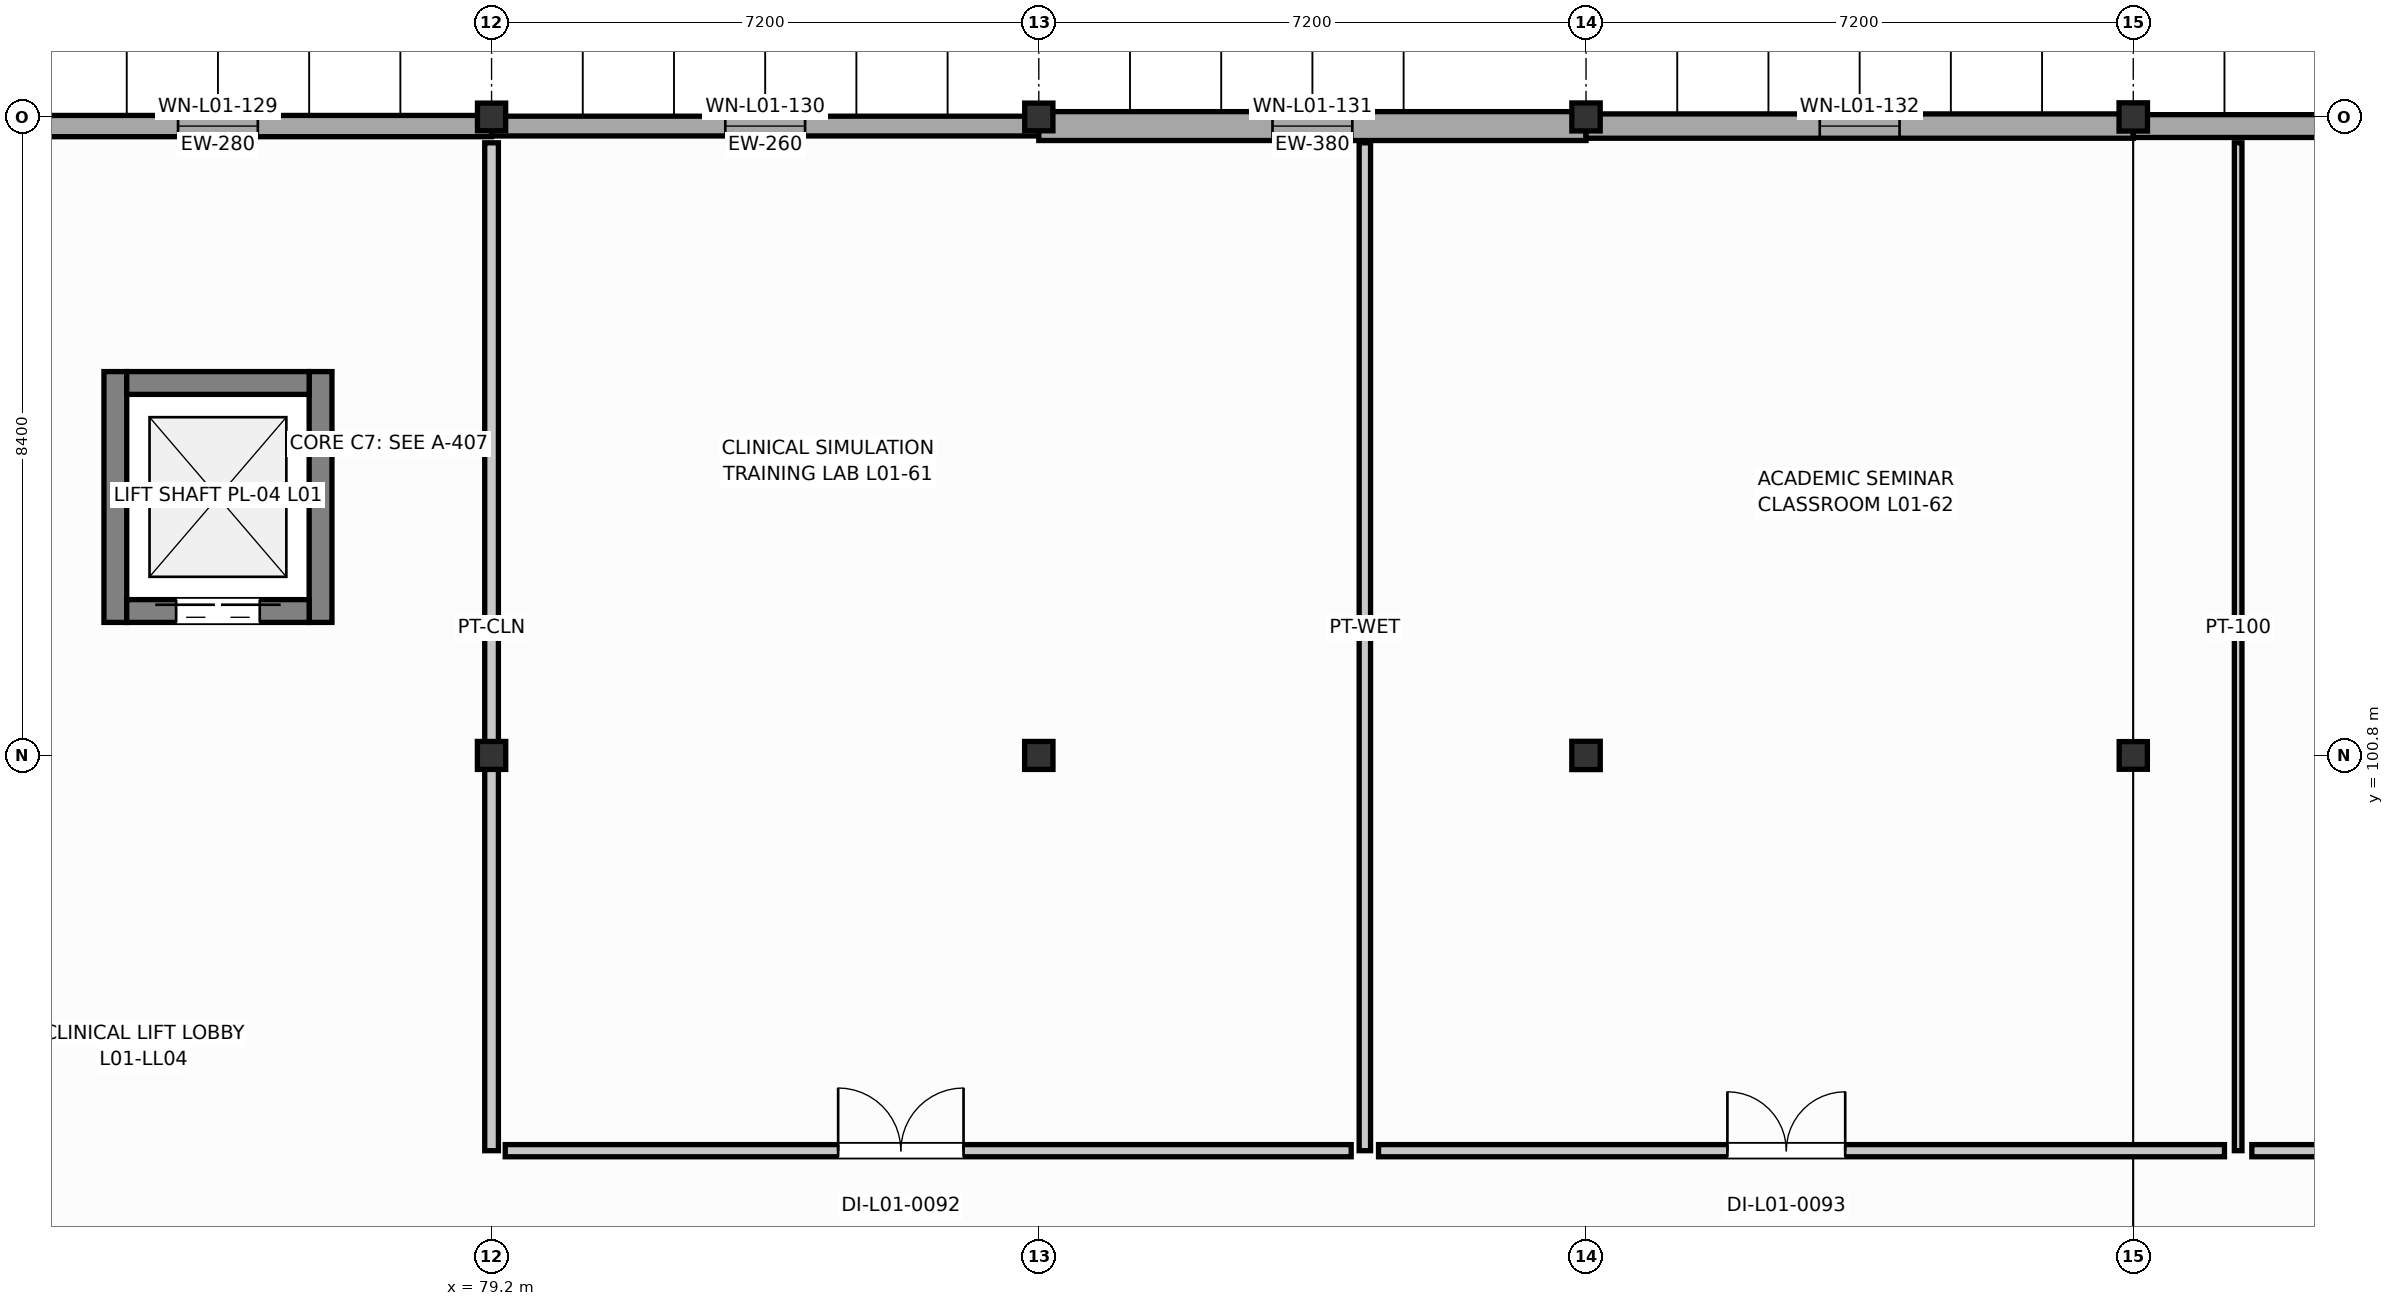
"""IFC4 building model, lengths in metres.
Left out: names, types, materials, properties, quantities, classifications, styles, units other than length and angle.
Written with IfcOpenShell. Run it as: python <this file> out.ifc"""

import sys

from ifc_helpers import new_model, si_unit, direction, frame, frame_2d, origin, origin_2d, place, context, subcontext, project, spatial, rectangle, i_section, extrude, element, fill, save


model = new_model("IFC4")
c1 = context("Model", 3, precision=1e-05, world=origin(), true_north=direction((0.0, 1.0)))
c2 = subcontext(c1, "Body", "Model", "MODEL_VIEW")
j1 = project(units=[si_unit("LENGTHUNIT", "METRE"), si_unit("PLANEANGLEUNIT", "RADIAN")], contexts=[c1])
p1 = place(None, origin())
s1 = spatial("IfcSite", under=j1, at=p1, CompositionType="ELEMENT")
p2 = place(p1, origin())
s2 = spatial("IfcBuilding", under=s1, at=p2, CompositionType="ELEMENT")
p3 = place(p2, frame((0.0, 0.0, 4.8)))
s3 = spatial("IfcBuildingStorey", under=s2, at=p3, CompositionType="ELEMENT", Elevation=4.8)
p4 = place(p3, frame((79.2, 100.8, 0.0), z_axis=(0.0, 0.0, 1.0), x_axis=(1.0, 0.0, 0.0)))
e1 = element("IfcColumn", 1, at=p4, inside=s3, PredefinedType="COLUMN", context=c2, shape_type="SweptSolid", body=[
    extrude(i_section(OverallWidth=0.373, OverallDepth=0.368, WebThickness=0.015, FlangeThickness=0.024, FilletRadius=0.02, at=origin_2d()), origin(), (0.0, 0.0, 1.0), 4.2),
])
p5 = place(p3, frame((79.2, 109.2, 0.0), z_axis=(0.0, 0.0, 1.0), x_axis=(1.0, 0.0, 0.0)))
e2 = element("IfcColumn", 2, at=p5, inside=s3, PredefinedType="COLUMN", context=c2, shape_type="SweptSolid", body=[
    extrude(i_section(OverallWidth=0.371, OverallDepth=0.364, WebThickness=0.013, FlangeThickness=0.022, FilletRadius=0.02, at=origin_2d()), origin(), (0.0, 0.0, 1.0), 4.2),
])
p6 = place(p3, frame((86.4, 100.8, 0.0), z_axis=(0.0, 0.0, 1.0), x_axis=(1.0, 0.0, 0.0)))
e3 = element("IfcColumn", 3, at=p6, inside=s3, PredefinedType="COLUMN", context=c2, shape_type="SweptSolid", body=[
    extrude(i_section(OverallWidth=0.373, OverallDepth=0.368, WebThickness=0.015, FlangeThickness=0.024, FilletRadius=0.02, at=origin_2d()), origin(), (0.0, 0.0, 1.0), 4.2),
])
p7 = place(p3, frame((86.4, 109.2, 0.0), z_axis=(0.0, 0.0, 1.0), x_axis=(1.0, 0.0, 0.0)))
e4 = element("IfcColumn", 4, at=p7, inside=s3, PredefinedType="COLUMN", context=c2, shape_type="SweptSolid", body=[
    extrude(i_section(OverallWidth=0.371, OverallDepth=0.364, WebThickness=0.013, FlangeThickness=0.022, FilletRadius=0.02, at=origin_2d()), origin(), (0.0, 0.0, 1.0), 4.2),
])
p8 = place(p3, frame((93.6, 100.8, 0.0), z_axis=(0.0, 0.0, 1.0), x_axis=(1.0, 0.0, 0.0)))
e5 = element("IfcColumn", 5, at=p8, inside=s3, PredefinedType="COLUMN", context=c2, shape_type="SweptSolid", body=[
    extrude(i_section(OverallWidth=0.374, OverallDepth=0.372, WebThickness=0.016, FlangeThickness=0.026, FilletRadius=0.02, at=origin_2d()), origin(), (0.0, 0.0, 1.0), 4.2),
])
p9 = place(p3, frame((93.6, 109.2, 0.0), z_axis=(0.0, 0.0, 1.0), x_axis=(1.0, 0.0, 0.0)))
e6 = element("IfcColumn", 6, at=p9, inside=s3, PredefinedType="COLUMN", context=c2, shape_type="SweptSolid", body=[
    extrude(i_section(OverallWidth=0.373, OverallDepth=0.368, WebThickness=0.015, FlangeThickness=0.024, FilletRadius=0.02, at=origin_2d()), origin(), (0.0, 0.0, 1.0), 4.2),
])
p10 = place(p3, frame((100.8, 100.8, 0.0), z_axis=(0.0, 0.0, 1.0), x_axis=(1.0, 0.0, 0.0)))
e7 = element("IfcColumn", 7, at=p10, inside=s3, PredefinedType="COLUMN", context=c2, shape_type="SweptSolid", body=[
    extrude(i_section(OverallWidth=0.371, OverallDepth=0.364, WebThickness=0.013, FlangeThickness=0.022, FilletRadius=0.02, at=origin_2d()), origin(), (0.0, 0.0, 1.0), 4.2),
])
p11 = place(p3, frame((100.8, 109.2, 0.0), z_axis=(0.0, 0.0, 1.0), x_axis=(1.0, 0.0, 0.0)))
e8 = element("IfcColumn", 8, at=p11, inside=s3, PredefinedType="COLUMN", context=c2, shape_type="SweptSolid", body=[
    extrude(i_section(OverallWidth=0.374, OverallDepth=0.372, WebThickness=0.016, FlangeThickness=0.026, FilletRadius=0.02, at=origin_2d()), origin(), (0.0, 0.0, 1.0), 4.2),
])
for number, where, z_axis, x_axis in (
    (9, (74.25, 102.55, 0.0), (0.0, 0.0, 1.0), (0.0, 1.0, 0.0)),
    (10, (76.95, 102.55, 0.0), (0.0, 0.0, 1.0), (0.0, 1.0, 0.0)),
):
    element("IfcWall", number, at=place(p3, frame(where, z_axis=z_axis, x_axis=x_axis)), inside=s3, PredefinedType="SHEAR", context=c2, shape_type="SweptSolid", body=[
        extrude(rectangle(XDim=3.3, YDim=0.3, at=frame_2d((1.65, 0.0))), origin(), (0.0, 0.0, 1.0), 3.97),
    ])
p12 = place(p3, frame((74.4, 105.7, 0.0), z_axis=(0.0, 0.0, 1.0), x_axis=(1.0, 0.0, 0.0)))
e11 = element("IfcWall", 11, at=p12, inside=s3, PredefinedType="SHEAR", context=c2, shape_type="SweptSolid", body=[
    extrude(rectangle(XDim=2.4, YDim=0.3, at=frame_2d((1.2, 0.0))), origin(), (0.0, 0.0, 1.0), 3.97),
])
p13 = place(p3, frame((74.4, 102.7, 0.0), z_axis=(0.0, 0.0, 1.0), x_axis=(1.0, 0.0, 0.0)))
e12 = element("IfcWall", 12, at=p13, inside=s3, PredefinedType="SHEAR", context=c2, shape_type="SweptSolid", body=[
    extrude(rectangle(XDim=2.4, YDim=0.3, at=frame_2d((1.2, 0.0))), origin(), (0.0, 0.0, 1.0), 3.97),
])
p14 = place(p13, frame((0.65, 0.0, 0.0)))
e13 = element("IfcOpeningElement", 13, at=p14, cuts=e12, PredefinedType="OPENING", context=c2, shape_type="SweptSolid", body=[
    extrude(rectangle(XDim=1.1, YDim=2.15, at=frame_2d((0.55, 1.075))), frame((0.0, 0.16, 0.0), z_axis=(0.0, -1.0, 0.0), x_axis=(1.0, 0.0, 0.0)), (0.0, 0.0, 1.0), 0.32),
])
p15 = place(p3, frame((72.0, 109.08, 0.0), z_axis=(0.0, 0.0, 1.0), x_axis=(1.0, 0.0, 0.0)))
e14 = element("IfcWall", 14, at=p15, inside=s3, PredefinedType="SOLIDWALL", context=c2, shape_type="SweptSolid", body=[
    extrude(rectangle(XDim=7.2, YDim=0.28, at=frame_2d((3.6, 0.0))), origin(), (0.0, 0.0, 1.0), 3.482),
])
p16 = place(p15, frame((3.075, 0.0, 0.95)))
e15 = element("IfcOpeningElement", 15, at=p16, cuts=e14, PredefinedType="OPENING", context=c2, shape_type="SweptSolid", body=[
    extrude(rectangle(XDim=1.05, YDim=1.15, at=frame_2d((0.525, 0.575))), frame((0.0, 0.15, 0.0), z_axis=(0.0, -1.0, 0.0), x_axis=(1.0, 0.0, 0.0)), (0.0, 0.0, 1.0), 0.3),
])
p17 = place(p3, frame((79.2, 109.08, 0.0), z_axis=(0.0, 0.0, 1.0), x_axis=(1.0, 0.0, 0.0)))
e16 = element("IfcWall", 16, at=p17, inside=s3, PredefinedType="SOLIDWALL", context=c2, shape_type="SweptSolid", body=[
    extrude(rectangle(XDim=7.2, YDim=0.26, at=frame_2d((3.6, 0.0))), origin(), (0.0, 0.0, 1.0), 3.482),
])
p18 = place(p17, frame((3.075, 0.0, 0.95)))
e17 = element("IfcOpeningElement", 17, at=p18, cuts=e16, PredefinedType="OPENING", context=c2, shape_type="SweptSolid", body=[
    extrude(rectangle(XDim=1.05, YDim=1.35, at=frame_2d((0.525, 0.675))), frame((0.0, 0.14, 0.0), z_axis=(0.0, -1.0, 0.0), x_axis=(1.0, 0.0, 0.0)), (0.0, 0.0, 1.0), 0.28),
])
p19 = place(p3, frame((86.4, 109.08, 0.0), z_axis=(0.0, 0.0, 1.0), x_axis=(1.0, 0.0, 0.0)))
e18 = element("IfcWall", 18, at=p19, inside=s3, PredefinedType="SOLIDWALL", context=c2, shape_type="SweptSolid", body=[
    extrude(rectangle(XDim=7.2, YDim=0.38, at=frame_2d((3.6, 0.0))), origin(), (0.0, 0.0, 1.0), 3.482),
])
p20 = place(p19, frame((3.075, 0.0, 0.95)))
e19 = element("IfcOpeningElement", 19, at=p20, cuts=e18, PredefinedType="OPENING", context=c2, shape_type="SweptSolid", body=[
    extrude(rectangle(XDim=1.05, YDim=1.55, at=frame_2d((0.525, 0.775))), frame((0.0, 0.2, 0.0), z_axis=(0.0, -1.0, 0.0), x_axis=(1.0, 0.0, 0.0)), (0.0, 0.0, 1.0), 0.4),
])
p21 = place(p3, frame((93.6, 109.08, 0.0), z_axis=(0.0, 0.0, 1.0), x_axis=(1.0, 0.0, 0.0)))
e20 = element("IfcWall", 20, at=p21, inside=s3, PredefinedType="SOLIDWALL", context=c2, shape_type="SweptSolid", body=[
    extrude(rectangle(XDim=7.2, YDim=0.32, at=frame_2d((3.6, 0.0))), origin(), (0.0, 0.0, 1.0), 3.482),
])
p22 = place(p21, frame((3.075, 0.0, 0.95)))
e21 = element("IfcOpeningElement", 21, at=p22, cuts=e20, PredefinedType="OPENING", context=c2, shape_type="SweptSolid", body=[
    extrude(rectangle(XDim=1.05, YDim=1.75, at=frame_2d((0.525, 0.875))), frame((0.0, 0.17, 0.0), z_axis=(0.0, -1.0, 0.0), x_axis=(1.0, 0.0, 0.0)), (0.0, 0.0, 1.0), 0.34),
])
p23 = place(p3, frame((100.8, 109.08, 0.0), z_axis=(0.0, 0.0, 1.0), x_axis=(1.0, 0.0, 0.0)))
e22 = element("IfcWall", 22, at=p23, inside=s3, PredefinedType="SOLIDWALL", context=c2, shape_type="SweptSolid", body=[
    extrude(rectangle(XDim=7.2, YDim=0.3, at=frame_2d((3.6, 0.0))), origin(), (0.0, 0.0, 1.0), 3.482),
])
p24 = place(p23, frame((3.0, 0.0, 0.95)))
e23 = element("IfcOpeningElement", 23, at=p24, cuts=e22, PredefinedType="OPENING", context=c2, shape_type="SweptSolid", body=[
    extrude(rectangle(XDim=1.2, YDim=1.15, at=frame_2d((0.6, 0.575))), frame((0.0, 0.16, 0.0), z_axis=(0.0, -1.0, 0.0), x_axis=(1.0, 0.0, 0.0)), (0.0, 0.0, 1.0), 0.32),
])
p25 = place(p3, frame((79.2, 95.6, 0.0), z_axis=(0.0, 0.0, 1.0), x_axis=(0.0, 1.0, 0.0)))
e24 = element("IfcWall", 24, at=p25, inside=s3, PredefinedType="PARTITIONING", context=c2, shape_type="SweptSolid", body=[
    extrude(rectangle(XDim=13.26, YDim=0.18, at=frame_2d((6.63, 0.0))), origin(), (0.0, 0.0, 1.0), 3.328),
])
p26 = place(p3, frame((90.69, 108.86, 0.0), z_axis=(0.0, 0.0, 1.0), x_axis=(0.0, -1.0, 0.0)))
e25 = element("IfcWall", 25, at=p26, inside=s3, PredefinedType="PLUMBINGWALL", context=c2, shape_type="SweptSolid", body=[
    extrude(rectangle(XDim=13.26, YDim=0.15, at=frame_2d((6.63, 0.0))), origin(), (0.0, 0.0, 1.0), 3.535),
])
p27 = place(p3, frame((90.51, 95.6, 0.0), z_axis=(0.0, 0.0, 1.0), x_axis=(-1.0, 0.0, 0.0)))
e26 = element("IfcWall", 26, at=p27, inside=s3, PredefinedType="PARTITIONING", context=c2, shape_type="SweptSolid", body=[
    extrude(rectangle(XDim=11.13, YDim=0.16, at=frame_2d((5.565, 0.0))), origin(), (0.0, 0.0, 1.0), 3.328),
])
p28 = place(p27, frame((5.1, 0.0, 0.0)))
e27 = element("IfcOpeningElement", 27, at=p28, cuts=e26, PredefinedType="OPENING", context=c2, shape_type="SweptSolid", body=[
    extrude(rectangle(XDim=1.65, YDim=2.2, at=frame_2d((0.825, 1.1))), frame((0.0, 0.09, 0.0), z_axis=(0.0, -1.0, 0.0), x_axis=(1.0, 0.0, 0.0)), (0.0, 0.0, 1.0), 0.18),
])
p29 = place(p3, frame((102.18, 108.86, 0.0), z_axis=(0.0, 0.0, 1.0), x_axis=(0.0, -1.0, 0.0)))
e28 = element("IfcWall", 28, at=p29, inside=s3, PredefinedType="PARTITIONING", context=c2, shape_type="SweptSolid", body=[
    extrude(rectangle(XDim=13.26, YDim=0.1, at=frame_2d((6.63, 0.0))), origin(), (0.0, 0.0, 1.0), 3.257),
])
p30 = place(p3, frame((102.0, 95.6, 0.0), z_axis=(0.0, 0.0, 1.0), x_axis=(-1.0, 0.0, 0.0)))
e29 = element("IfcWall", 29, at=p30, inside=s3, PredefinedType="PARTITIONING", context=c2, shape_type="SweptSolid", body=[
    extrude(rectangle(XDim=11.13, YDim=0.16, at=frame_2d((5.565, 0.0))), origin(), (0.0, 0.0, 1.0), 3.175),
])
p31 = place(p30, frame((4.99, 0.0, 0.0)))
e30 = element("IfcOpeningElement", 30, at=p31, cuts=e29, PredefinedType="OPENING", context=c2, shape_type="SweptSolid", body=[
    extrude(rectangle(XDim=1.55, YDim=2.2, at=frame_2d((0.775, 1.1))), frame((0.0, 0.09, 0.0), z_axis=(0.0, -1.0, 0.0), x_axis=(1.0, 0.0, 0.0)), (0.0, 0.0, 1.0), 0.18),
])
p32 = place(p3, frame((113.49, 95.6, 0.0), z_axis=(0.0, 0.0, 1.0), x_axis=(-1.0, 0.0, 0.0)))
e31 = element("IfcWall", 31, at=p32, inside=s3, PredefinedType="PARTITIONING", context=c2, shape_type="SweptSolid", body=[
    extrude(rectangle(XDim=11.13, YDim=0.16, at=frame_2d((5.565, 0.0))), origin(), (0.0, 0.0, 1.0), 3.328),
])
p33 = place(p32, frame((5.225, 0.0, 0.0)))
e32 = element("IfcOpeningElement", 32, at=p33, cuts=e31, PredefinedType="OPENING", context=c2, shape_type="SweptSolid", body=[
    extrude(rectangle(XDim=1.08, YDim=2.15, at=frame_2d((0.54, 1.075))), frame((0.0, 0.09, 0.0), z_axis=(0.0, -1.0, 0.0), x_axis=(1.0, 0.0, 0.0)), (0.0, 0.0, 1.0), 0.18),
])
p34 = place(p14, origin())
e33 = element("IfcDoor", 33, at=p34, inside=s3, OperationType="DOUBLE_DOOR_SLIDING", PredefinedType="DOOR", context=c2, shape_type="SweptSolid", body=[
    extrude(rectangle(XDim=1.1, YDim=2.15, at=frame_2d((0.55, 1.075))), frame((0.0, 0.025, 0.0), z_axis=(0.0, -1.0, 0.0), x_axis=(1.0, 0.0, 0.0)), (0.0, 0.0, 1.0), 0.05),
])
fill(e13, e33)
p35 = place(p16, origin())
e34 = element("IfcWindow", 34, at=p35, inside=s3, PartitioningType="SINGLE_PANEL", PredefinedType="WINDOW", context=c2, shape_type="SweptSolid", body=[
    extrude(rectangle(XDim=1.05, YDim=1.15, at=frame_2d((0.525, 0.575))), frame((0.0, 0.03, 0.0), z_axis=(0.0, -1.0, 0.0), x_axis=(1.0, 0.0, 0.0)), (0.0, 0.0, 1.0), 0.06),
])
fill(e15, e34)
p36 = place(p18, origin())
e35 = element("IfcWindow", 35, at=p36, inside=s3, PartitioningType="SINGLE_PANEL", PredefinedType="WINDOW", context=c2, shape_type="SweptSolid", body=[
    extrude(rectangle(XDim=1.05, YDim=1.35, at=frame_2d((0.525, 0.675))), frame((0.0, 0.03, 0.0), z_axis=(0.0, -1.0, 0.0), x_axis=(1.0, 0.0, 0.0)), (0.0, 0.0, 1.0), 0.06),
])
fill(e17, e35)
p37 = place(p20, origin())
e36 = element("IfcWindow", 36, at=p37, inside=s3, PartitioningType="SINGLE_PANEL", PredefinedType="WINDOW", context=c2, shape_type="SweptSolid", body=[
    extrude(rectangle(XDim=1.05, YDim=1.55, at=frame_2d((0.525, 0.775))), frame((0.0, 0.03, 0.0), z_axis=(0.0, -1.0, 0.0), x_axis=(1.0, 0.0, 0.0)), (0.0, 0.0, 1.0), 0.06),
])
fill(e19, e36)
p38 = place(p22, origin())
e37 = element("IfcWindow", 37, at=p38, inside=s3, PartitioningType="SINGLE_PANEL", PredefinedType="WINDOW", context=c2, shape_type="SweptSolid", body=[
    extrude(rectangle(XDim=1.05, YDim=1.75, at=frame_2d((0.525, 0.875))), frame((0.0, 0.03, 0.0), z_axis=(0.0, -1.0, 0.0), x_axis=(1.0, 0.0, 0.0)), (0.0, 0.0, 1.0), 0.06),
])
fill(e21, e37)
p39 = place(p28, frame((1.65, 0.0, 0.0), z_axis=(0.0, 0.0, 1.0), x_axis=(-1.0, 0.0, 0.0)))
e38 = element("IfcDoor", 38, at=p39, inside=s3, OperationType="DOUBLE_DOOR_SINGLE_SWING", PredefinedType="DOOR", context=c2, shape_type="SweptSolid", body=[
    extrude(rectangle(XDim=1.65, YDim=2.2, at=frame_2d((0.825, 1.1))), frame((0.0, 0.025, 0.0), z_axis=(0.0, -1.0, 0.0), x_axis=(1.0, 0.0, 0.0)), (0.0, 0.0, 1.0), 0.05),
])
fill(e27, e38)
p40 = place(p31, frame((1.55, 0.0, 0.0), z_axis=(0.0, 0.0, 1.0), x_axis=(-1.0, 0.0, 0.0)))
e39 = element("IfcDoor", 39, at=p40, inside=s3, OperationType="DOUBLE_DOOR_SINGLE_SWING", PredefinedType="DOOR", context=c2, shape_type="SweptSolid", body=[
    extrude(rectangle(XDim=1.55, YDim=2.2, at=frame_2d((0.775, 1.1))), frame((0.0, 0.025, 0.0), z_axis=(0.0, -1.0, 0.0), x_axis=(1.0, 0.0, 0.0)), (0.0, 0.0, 1.0), 0.05),
])
fill(e30, e39)
save(model, sys.argv[1])
